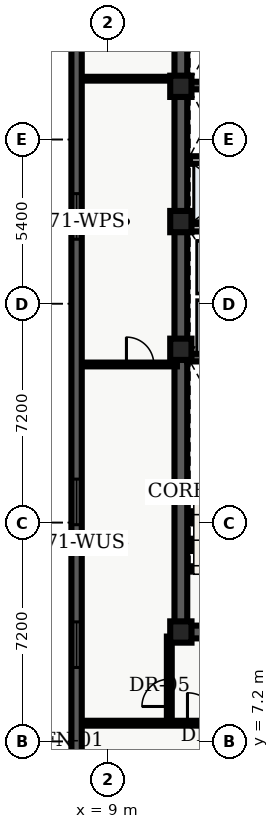
"""IFC4 building model, lengths in metres.
Left out: names, types, materials, properties, quantities, classifications, styles, units other than length and angle.
Written with IfcOpenShell. Run it as: python <this file> out.ifc"""

import sys

from ifc_helpers import new_model, entity, si_unit, converted_unit, direction, frame, origin_with_axes, origin_2d_with_axis, place, context, subcontext, project, spatial, polyline, rectangle, outline, extrude, element, fill, save


model = new_model("IFC4")
c1 = context("Model", 3, precision=1e-05, world=origin_with_axes(), true_north=direction((0.0, 1.0)))
c2 = subcontext(c1, "Body", "Model", "MODEL_VIEW")
j1 = project(units=[si_unit("LENGTHUNIT", "METRE"), converted_unit("PLANEANGLEUNIT", "DEGREE", entity("IfcPlaneAngleMeasure", 0.017), si_unit("PLANEANGLEUNIT", "RADIAN"), dimensions=[0, 0, 0, 0, 0, 0, 0])], contexts=[c1])
p1 = place(None, origin_with_axes())
s1 = spatial("IfcSite", under=j1, at=p1, CompositionType="ELEMENT")
p2 = place(p1, origin_with_axes())
s2 = spatial("IfcBuilding", under=s1, at=p2, CompositionType="ELEMENT")
p3 = place(p2, frame((0.0, 0.0, 288.0), z_axis=(0.0, 0.0, 1.0), x_axis=(1.0, 0.0, 0.0)))
s3 = spatial("IfcBuildingStorey", under=s2, at=p3, CompositionType="ELEMENT", Elevation=288.0)
p4 = place(p3, frame((11.4, 10.8, 0.0), z_axis=(0.0, 0.0, 1.0), x_axis=(0.0, 1.0, 0.0)))
e1 = element("IfcWall", 1, at=p4, inside=s3, PredefinedType="SHEAR", context=c2, shape_type="SweptSolid", body=[
    extrude(outline(polyline([(0.0, -0.21), (27.0, -0.21), (27.0, 0.21), (0.0, 0.21), (0.0, -0.21)])), origin_with_axes(), (0.0, 0.0, 1.0), 3.66),
])
p5 = place(p3, frame((11.4, 10.8, 0.0), z_axis=(0.0, 0.0, 1.0), x_axis=(1.0, 0.0, 0.0)))
e2 = element("IfcWall", 2, at=p5, inside=s3, PredefinedType="SHEAR", context=c2, shape_type="SweptSolid", body=[
    extrude(outline(polyline([(0.0, -0.21), (7.2, -0.21), (7.2, 0.21), (0.0, 0.21), (0.0, -0.21)])), origin_with_axes(), (0.0, 0.0, 1.0), 3.66),
])
p6 = place(p5, frame((2.625, 0.0, 0.0), z_axis=(0.0, 0.0, 1.0), x_axis=(1.0, 0.0, 0.0)))
e3 = element("IfcOpeningElement", 3, at=p6, cuts=e2, PredefinedType="OPENING", context=c2, shape_type="SweptSolid", body=[
    extrude(rectangle(XDim=1.05, YDim=0.44, at=origin_2d_with_axis()), origin_with_axes(), (0.0, 0.0, 1.0), 2.15),
])
for number, where, z_axis, x_axis in (
    (4, (11.61, 19.825, 0.0), (0.0, 0.0, 1.0), (1.0, 0.0, 0.0)),
    (5, (11.61, 28.775, 0.0), (0.0, 0.0, 1.0), (1.0, 0.0, 0.0)),
):
    element("IfcWall", number, at=place(p3, frame(where, z_axis=z_axis, x_axis=x_axis)), inside=s3, PredefinedType="SHEAR", context=c2, shape_type="SweptSolid", body=[
        extrude(outline(polyline([(0.0, -0.125), (6.78, -0.125), (6.78, 0.125), (0.0, 0.125), (0.0, -0.125)])), origin_with_axes(), (0.0, 0.0, 1.0), 3.66),
    ])
p7 = place(p3, frame((11.7, 24.1, 0.0), z_axis=(0.0, 0.0, 1.0), x_axis=(1.0, 0.0, 0.0)))
e6 = element("IfcWall", 6, at=p7, inside=s3, PredefinedType="SOLIDWALL", context=c2, shape_type="SweptSolid", body=[
    extrude(outline(polyline([(0.0, -0.125), (6.6, -0.125), (6.6, 0.125), (0.0, 0.125), (0.0, -0.125)])), origin_with_axes(), (0.0, 0.0, 1.0), 2.7),
])
p8 = place(p7, frame((3.75, 0.0, 0.0), z_axis=(0.0, 0.0, 1.0), x_axis=(1.0, 0.0, 0.0)))
e7 = element("IfcOpeningElement", 7, at=p8, cuts=e6, PredefinedType="OPENING", context=c2, shape_type="SweptSolid", body=[
    extrude(rectangle(XDim=0.9, YDim=0.27, at=origin_2d_with_axis()), origin_with_axes(), (0.0, 0.0, 1.0), 2.15),
])
p9 = place(p3, frame((11.7, 26.325, 0.0), z_axis=(0.0, 0.0, 1.0), x_axis=(1.0, 0.0, 0.0)))
e8 = element("IfcWall", 8, at=p9, inside=s3, PredefinedType="SOLIDWALL", context=c2, shape_type="SweptSolid", body=[
    extrude(outline(polyline([(0.0, -0.125), (6.6, -0.125), (6.6, 0.125), (0.0, 0.125), (0.0, -0.125)])), origin_with_axes(), (0.0, 0.0, 1.0), 2.7),
])
p10 = place(p9, frame((3.5, 0.0, 0.0), z_axis=(0.0, 0.0, 1.0), x_axis=(1.0, 0.0, 0.0)))
e9 = element("IfcOpeningElement", 9, at=p10, cuts=e8, PredefinedType="OPENING", context=c2, shape_type="SweptSolid", body=[
    extrude(rectangle(XDim=0.9, YDim=0.27, at=origin_2d_with_axis()), origin_with_axes(), (0.0, 0.0, 1.0), 2.15),
])
for number, where, z_axis, x_axis in (
    (10, (11.4, 10.8, 0.0), (0.0, 0.0, 1.0), (1.0, 0.0, 0.0)),
    (11, (11.4, 20.1, 0.0), (0.0, 0.0, 1.0), (1.0, 0.0, 0.0)),
    (12, (11.4, 24.3, 0.0), (0.0, 0.0, 1.0), (1.0, 0.0, 0.0)),
    (13, (11.4, 28.75, 0.0), (0.0, 0.0, 1.0), (1.0, 0.0, 0.0)),
):
    element("IfcColumn", number, at=place(p3, frame(where, z_axis=z_axis, x_axis=x_axis)), inside=s3, PredefinedType="COLUMN", context=c2, shape_type="SweptSolid", body=[
        extrude(rectangle(XDim=0.7, YDim=0.7, at=origin_2d_with_axis()), origin_with_axes(), (0.0, 0.0, 1.0), 3.9),
    ])
p11 = place(p3, frame((8.135, 7.8, 0.0), z_axis=(0.0, 0.0, 1.0), x_axis=(1.0, 0.0, 0.0)))
e14 = element("IfcWall", 14, at=p11, inside=s3, PredefinedType="PARTITIONING", context=c2, shape_type="SweptSolid", body=[
    extrude(outline(polyline([(0.0, -0.08), (12.165, -0.08), (12.165, 0.08), (0.0, 0.08), (0.0, -0.08)])), origin_with_axes(), (0.0, 0.0, 1.0), 2.7),
])
p12 = place(p11, frame((3.982, 0.0, 0.0), z_axis=(0.0, 0.0, 1.0), x_axis=(1.0, 0.0, 0.0)))
e15 = element("IfcOpeningElement", 15, at=p12, cuts=e14, PredefinedType="OPENING", context=c2, shape_type="SweptSolid", body=[
    extrude(rectangle(XDim=1.0, YDim=0.18, at=origin_2d_with_axis()), origin_with_axes(), (0.0, 0.0, 1.0), 2.15),
])
p13 = place(p11, frame((8.782, 0.0, 0.0), z_axis=(0.0, 0.0, 1.0), x_axis=(1.0, 0.0, 0.0)))
e16 = element("IfcOpeningElement", 16, at=p13, cuts=e14, PredefinedType="OPENING", context=c2, shape_type="SweptSolid", body=[
    extrude(rectangle(XDim=1.0, YDim=0.18, at=origin_2d_with_axis()), origin_with_axes(), (0.0, 0.0, 1.0), 2.15),
])
p14 = place(p3, frame((11.02, 7.8, 0.0), z_axis=(0.0, 0.0, 1.0), x_axis=(0.0, 1.0, 0.0)))
e17 = element("IfcWall", 17, at=p14, inside=s3, PredefinedType="PARTITIONING", context=c2, shape_type="SweptSolid", body=[
    extrude(outline(polyline([(0.0, -0.08), (2.85, -0.08), (2.85, 0.08), (0.0, 0.08), (0.0, -0.08)])), origin_with_axes(), (0.0, 0.0, 1.0), 2.7),
])
p15 = place(p14, frame((1.0, 0.0, 0.0), z_axis=(0.0, 0.0, 1.0), x_axis=(1.0, 0.0, 0.0)))
e18 = element("IfcOpeningElement", 18, at=p15, cuts=e17, PredefinedType="OPENING", context=c2, shape_type="SweptSolid", body=[
    extrude(rectangle(XDim=0.9, YDim=0.18, at=origin_2d_with_axis()), origin_with_axes(), (0.0, 0.0, 1.0), 2.15),
])
p16 = place(p3, frame((8.135, 19.6, 0.0), z_axis=(0.0, 0.0, 1.0), x_axis=(1.0, 0.0, 0.0)))
e19 = element("IfcWall", 19, at=p16, inside=s3, PredefinedType="PARTITIONING", context=c2, shape_type="SweptSolid", body=[
    extrude(outline(polyline([(0.0, -0.062), (3.135, -0.062), (3.135, 0.062), (0.0, 0.062), (0.0, -0.062)])), origin_with_axes(), (0.0, 0.0, 1.0), 2.7),
])
p17 = place(p16, frame((1.925, 0.0, 0.0), z_axis=(0.0, 0.0, 1.0), x_axis=(1.0, 0.0, 0.0)))
e20 = element("IfcOpeningElement", 20, at=p17, cuts=e19, PredefinedType="OPENING", context=c2, shape_type="SweptSolid", body=[
    extrude(rectangle(XDim=0.9, YDim=0.145, at=origin_2d_with_axis()), origin_with_axes(), (0.0, 0.0, 1.0), 2.15),
])
p18 = place(p3, frame((8.135, 29.0, 0.0), z_axis=(0.0, 0.0, 1.0), x_axis=(1.0, 0.0, 0.0)))
e21 = element("IfcWall", 21, at=p18, inside=s3, PredefinedType="PARTITIONING", context=c2, shape_type="SweptSolid", body=[
    extrude(outline(polyline([(0.0, -0.062), (3.135, -0.062), (3.135, 0.062), (0.0, 0.062), (0.0, -0.062)])), origin_with_axes(), (0.0, 0.0, 1.0), 2.7),
])
p19 = place(p3, frame((7.97, 2.74, 0.0), z_axis=(0.0, 0.0, 1.0), x_axis=(0.0, 1.0, 0.0)))
e22 = element("IfcWall", 22, at=p19, inside=s3, PredefinedType="SOLIDWALL", context=c2, shape_type="SweptSolid", body=[
    extrude(outline(polyline([(0.0, -0.17), (43.46, -0.17), (43.46, 0.17), (0.0, 0.17), (0.0, -0.17)])), origin_with_axes(), (0.0, 0.0, 1.0), 3.66),
])
p20 = place(p19, frame((2.948, 0.0, 0.45), z_axis=(0.0, 0.0, 1.0), x_axis=(1.0, 0.0, 0.0)))
e23 = element("IfcOpeningElement", 23, at=p20, cuts=e22, PredefinedType="OPENING", context=c2, shape_type="SweptSolid", body=[
    extrude(rectangle(XDim=1.5, YDim=0.36, at=origin_2d_with_axis()), origin_with_axes(), (0.0, 0.0, 1.0), 2.1),
])
p21 = place(p19, frame((7.643, 0.0, 0.45), z_axis=(0.0, 0.0, 1.0), x_axis=(1.0, 0.0, 0.0)))
e24 = element("IfcOpeningElement", 24, at=p21, cuts=e22, PredefinedType="OPENING", context=c2, shape_type="SweptSolid", body=[
    extrude(rectangle(XDim=1.5, YDim=0.36, at=origin_2d_with_axis()), origin_with_axes(), (0.0, 0.0, 1.0), 2.1),
])
p22 = place(p19, frame((12.339, 0.0, 0.45), z_axis=(0.0, 0.0, 1.0), x_axis=(1.0, 0.0, 0.0)))
e25 = element("IfcOpeningElement", 25, at=p22, cuts=e22, PredefinedType="OPENING", context=c2, shape_type="SweptSolid", body=[
    extrude(rectangle(XDim=1.5, YDim=0.36, at=origin_2d_with_axis()), origin_with_axes(), (0.0, 0.0, 1.0), 2.1),
])
p23 = place(p19, frame((21.73, 0.0, 0.45), z_axis=(0.0, 0.0, 1.0), x_axis=(1.0, 0.0, 0.0)))
e26 = element("IfcOpeningElement", 26, at=p23, cuts=e22, PredefinedType="OPENING", context=c2, shape_type="SweptSolid", body=[
    extrude(rectangle(XDim=1.5, YDim=0.36, at=origin_2d_with_axis()), origin_with_axes(), (0.0, 0.0, 1.0), 2.1),
])
p24 = place(p19, frame((31.121, 0.0, 0.45), z_axis=(0.0, 0.0, 1.0), x_axis=(1.0, 0.0, 0.0)))
e27 = element("IfcOpeningElement", 27, at=p24, cuts=e22, PredefinedType="OPENING", context=c2, shape_type="SweptSolid", body=[
    extrude(rectangle(XDim=1.5, YDim=0.36, at=origin_2d_with_axis()), origin_with_axes(), (0.0, 0.0, 1.0), 2.1),
])
p25 = place(p19, frame((35.817, 0.0, 0.45), z_axis=(0.0, 0.0, 1.0), x_axis=(1.0, 0.0, 0.0)))
e28 = element("IfcOpeningElement", 28, at=p25, cuts=e22, PredefinedType="OPENING", context=c2, shape_type="SweptSolid", body=[
    extrude(rectangle(XDim=1.5, YDim=0.36, at=origin_2d_with_axis()), origin_with_axes(), (0.0, 0.0, 1.0), 2.1),
])
p26 = place(p19, frame((40.512, 0.0, 0.45), z_axis=(0.0, 0.0, 1.0), x_axis=(1.0, 0.0, 0.0)))
e29 = element("IfcOpeningElement", 29, at=p26, cuts=e22, PredefinedType="OPENING", context=c2, shape_type="SweptSolid", body=[
    extrude(rectangle(XDim=1.5, YDim=0.36, at=origin_2d_with_axis()), origin_with_axes(), (0.0, 0.0, 1.0), 2.1),
])
p27 = place(p14, frame((1.0, 0.0, 0.0), z_axis=(0.0, 0.0, 1.0), x_axis=(1.0, 0.0, 0.0)))
e30 = element("IfcDoor", 30, at=p27, inside=s3, OperationType="SINGLE_SWING_LEFT", PredefinedType="DOOR", context=c2, shape_type="SweptSolid", body=[
    extrude(rectangle(XDim=0.9, YDim=0.09, at=origin_2d_with_axis()), origin_with_axes(), (0.0, 0.0, 1.0), 2.15),
])
fill(e18, e30)
p28 = place(p16, frame((1.925, 0.0, 0.0), z_axis=(0.0, 0.0, 1.0), x_axis=(1.0, 0.0, 0.0)))
e31 = element("IfcDoor", 31, at=p28, inside=s3, OperationType="SINGLE_SWING_LEFT", PredefinedType="DOOR", context=c2, shape_type="SweptSolid", body=[
    extrude(rectangle(XDim=0.9, YDim=0.075, at=origin_2d_with_axis()), origin_with_axes(), (0.0, 0.0, 1.0), 2.15),
])
fill(e20, e31)
p29 = place(p11, frame((3.982, 0.0, 0.0), z_axis=(0.0, 0.0, 1.0), x_axis=(1.0, 0.0, 0.0)))
e32 = element("IfcDoor", 32, at=p29, inside=s3, OperationType="SINGLE_SWING_LEFT", PredefinedType="DOOR", context=c2, shape_type="SweptSolid", body=[
    extrude(rectangle(XDim=1.0, YDim=0.09, at=origin_2d_with_axis()), origin_with_axes(), (0.0, 0.0, 1.0), 2.15),
])
fill(e15, e32)
p30 = place(p19, frame((7.643, 0.0, 0.45), z_axis=(0.0, 0.0, 1.0), x_axis=(1.0, 0.0, 0.0)))
e33 = element("IfcWindow", 33, at=p30, inside=s3, PredefinedType="WINDOW", context=c2, shape_type="SweptSolid", body=[
    extrude(rectangle(XDim=1.5, YDim=0.09, at=origin_2d_with_axis()), origin_with_axes(), (0.0, 0.0, 1.0), 2.1),
])
fill(e24, e33)
p31 = place(p19, frame((12.339, 0.0, 0.45), z_axis=(0.0, 0.0, 1.0), x_axis=(1.0, 0.0, 0.0)))
e34 = element("IfcWindow", 34, at=p31, inside=s3, PredefinedType="WINDOW", context=c2, shape_type="SweptSolid", body=[
    extrude(rectangle(XDim=1.5, YDim=0.09, at=origin_2d_with_axis()), origin_with_axes(), (0.0, 0.0, 1.0), 2.1),
])
fill(e25, e34)
p32 = place(p19, frame((21.73, 0.0, 0.45), z_axis=(0.0, 0.0, 1.0), x_axis=(1.0, 0.0, 0.0)))
e35 = element("IfcWindow", 35, at=p32, inside=s3, PredefinedType="WINDOW", context=c2, shape_type="SweptSolid", body=[
    extrude(rectangle(XDim=1.5, YDim=0.09, at=origin_2d_with_axis()), origin_with_axes(), (0.0, 0.0, 1.0), 2.1),
])
fill(e26, e35)
save(model, sys.argv[1])
